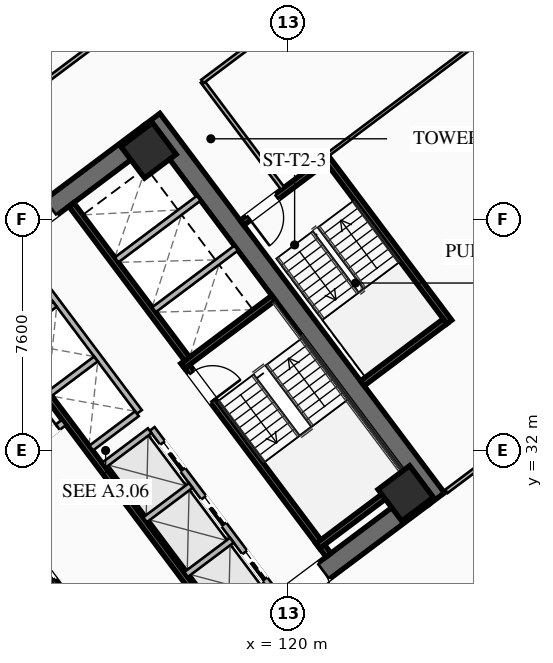
"""IFC4 building model, lengths in metres.
Left out: names, types, materials, properties, quantities, classifications, styles, units other than length and angle.
Written with IfcOpenShell. Run it as: python <this file> out.ifc"""

import sys

from ifc_helpers import new_model, si_unit, direction, frame, frame_2d, origin, origin_2d, place, context, subcontext, project, spatial, rectangle, hollow_rectangle, extrude, element, fill, save


model = new_model("IFC4")
c1 = context("Model", 3, precision=1e-05, world=origin(), true_north=direction((0.0, 1.0)))
c2 = subcontext(c1, "Body", "Model", "MODEL_VIEW")
j1 = project(units=[si_unit("LENGTHUNIT", "METRE"), si_unit("PLANEANGLEUNIT", "RADIAN")], contexts=[c1])
p1 = place(None, origin())
s1 = spatial("IfcSite", under=j1, at=p1, CompositionType="ELEMENT")
p2 = place(p1, origin())
s2 = spatial("IfcBuilding", under=s1, at=p2, CompositionType="ELEMENT")
p3 = place(p2, frame((0.0, 0.0, 102.7)))
s3 = spatial("IfcBuildingStorey", under=s2, at=p3, CompositionType="ELEMENT", Elevation=102.7)
for number, where, z_axis, x_axis in (
    (1, (112.476, 21.107, 0.0), (0.0, 0.0, 1.0), (-0.6, 0.8, 0.0)),
    (2, (115.524, 42.893, 0.0), (0.0, 0.0, 1.0), (0.6, -0.8, 0.0)),
):
    element("IfcWall", number, at=place(p3, frame(where, z_axis=z_axis, x_axis=x_axis)), inside=s3, PredefinedType="SHEAR", context=c2, shape_type="SweptSolid", body=[
        extrude(rectangle(XDim=15.6, YDim=0.65, at=frame_2d((7.8, 0.0))), origin(), (0.0, 0.0, 1.0), 3.55),
    ])
p4 = place(p3, frame((124.429, 30.478, 0.0), z_axis=(0.0, 0.0, 1.0), x_axis=(-0.799998028465, -0.600002628705, 0.0)))
e3 = element("IfcWall", 3, at=p4, inside=s3, PredefinedType="SHEAR", context=c2, shape_type="SweptSolid", body=[
    extrude(rectangle(XDim=14.86, YDim=0.65, at=frame_2d((7.43, 0.0))), origin(), (0.0, 0.0, 1.0), 3.55),
])
p5 = place(p4, frame((9.13, 0.0, 0.0)))
e4 = element("IfcOpeningElement", 4, at=p5, cuts=e3, PredefinedType="OPENING", context=c2, shape_type="SweptSolid", body=[
    extrude(rectangle(XDim=1.25, YDim=2.25, at=frame_2d((0.625, 1.125))), frame((0.0, 0.335, 0.0), z_axis=(0.0, -1.0, 0.0), x_axis=(1.0, 0.0, 0.0)), (0.0, 0.0, 1.0), 0.67),
])
p6 = place(p4, frame((4.08, 0.0, 0.0)))
e5 = element("IfcOpeningElement", 5, at=p6, cuts=e3, PredefinedType="OPENING", context=c2, shape_type="SweptSolid", body=[
    extrude(rectangle(XDim=1.25, YDim=2.25, at=frame_2d((0.625, 1.125))), frame((0.0, 0.335, 0.0), z_axis=(0.0, -1.0, 0.0), x_axis=(1.0, 0.0, 0.0)), (0.0, 0.0, 1.0), 0.67),
])
p7 = place(p3, frame((103.571, 33.522, 0.0), z_axis=(0.0, 0.0, 1.0), x_axis=(0.799998028465, 0.600002628705, 0.0)))
e6 = element("IfcWall", 6, at=p7, inside=s3, PredefinedType="SHEAR", context=c2, shape_type="SweptSolid", body=[
    extrude(rectangle(XDim=14.86, YDim=0.65, at=frame_2d((7.43, 0.0))), origin(), (0.0, 0.0, 1.0), 3.55),
])
p8 = place(p7, frame((4.48, 0.0, 0.0)))
e7 = element("IfcOpeningElement", 7, at=p8, cuts=e6, PredefinedType="OPENING", context=c2, shape_type="SweptSolid", body=[
    extrude(rectangle(XDim=1.25, YDim=2.25, at=frame_2d((0.625, 1.125))), frame((0.0, 0.335, 0.0), z_axis=(0.0, -1.0, 0.0), x_axis=(1.0, 0.0, 0.0)), (0.0, 0.0, 1.0), 0.67),
])
p9 = place(p7, frame((9.53, 0.0, 0.0)))
e8 = element("IfcOpeningElement", 8, at=p9, cuts=e6, PredefinedType="OPENING", context=c2, shape_type="SweptSolid", body=[
    extrude(rectangle(XDim=1.25, YDim=2.25, at=frame_2d((0.625, 1.125))), frame((0.0, 0.335, 0.0), z_axis=(0.0, -1.0, 0.0), x_axis=(1.0, 0.0, 0.0)), (0.0, 0.0, 1.0), 0.67),
])
for number, where, z_axis, x_axis in (
    (9, (123.87, 30.59, 0.0), (0.0, 0.0, 1.0), (0.8, 0.6, 0.0)),
    (10, (115.41, 41.87, 0.0), (0.0, 0.0, 1.0), (0.8, 0.6, 0.0)),
):
    element("IfcColumn", number, at=place(p3, frame(where, z_axis=z_axis, x_axis=x_axis)), inside=s3, PredefinedType="COLUMN", context=c2, shape_type="SweptSolid", body=[
        extrude(hollow_rectangle(XDim=1.3, YDim=1.3, WallThickness=0.05, at=origin_2d()), origin(), (0.0, 0.0, 1.0), 3.35),
    ])
p10 = place(p3, frame((116.56, 34.92, 0.0), z_axis=(0.0, 0.0, 1.0), x_axis=(0.600009827119, -0.799992629566, 0.0)))
e11 = element("IfcWall", 11, at=p10, inside=s3, PredefinedType="SHEAR", context=c2, shape_type="SweptSolid", body=[
    extrude(rectangle(XDim=7.95, YDim=0.2, at=frame_2d((3.975, 0.0))), origin(), (0.0, 0.0, 1.0), 3.35),
])
p11 = place(p10, frame((0.45, 0.0, 0.0)))
e12 = element("IfcOpeningElement", 12, at=p11, cuts=e11, PredefinedType="OPENING", context=c2, shape_type="SweptSolid", body=[
    extrude(rectangle(XDim=1.15, YDim=2.2, at=frame_2d((0.575, 1.1))), frame((0.0, 0.11, 0.0), z_axis=(0.0, -1.0, 0.0), x_axis=(1.0, 0.0, 0.0)), (0.0, 0.0, 1.0), 0.22),
])
for number, where, z_axis, x_axis in (
    (13, (116.54, 34.78, 0.0), (0.0, 0.0, 1.0), (0.8, 0.6, 0.0)),
    (14, (120.98, 28.86, 0.0), (0.0, 0.0, 1.0), (0.8, 0.6, 0.0)),
):
    element("IfcWall", number, at=place(p3, frame(where, z_axis=z_axis, x_axis=x_axis)), inside=s3, PredefinedType="SHEAR", context=c2, shape_type="SweptSolid", body=[
        extrude(rectangle(XDim=3.73, YDim=0.2, at=frame_2d((1.865, 0.0))), origin(), (0.0, 0.0, 1.0), 3.35),
    ])
p12 = place(p3, frame((117.938, 26.016, 0.0), z_axis=(0.0, 0.0, 1.0), x_axis=(-0.600005463273, 0.799995902516, 0.0)))
e15 = element("IfcWall", 15, at=p12, inside=s3, PredefinedType="SHEAR", context=c2, shape_type="SweptSolid", body=[
    extrude(rectangle(XDim=14.3, YDim=0.2, at=frame_2d((7.15, 0.0))), origin(), (0.0, 0.0, 1.0), 3.35),
])
p13 = place(p3, frame((110.104, 31.028, 0.0), z_axis=(0.0, 0.0, 1.0), x_axis=(0.800018601094, 0.59997519774, 0.0)))
e16 = element("IfcWall", 16, at=p13, inside=s3, PredefinedType="SOLIDWALL", context=c2, shape_type="SweptSolid", body=[
    extrude(rectangle(XDim=3.15, YDim=0.22, at=frame_2d((1.575, 0.0))), origin(), (0.0, 0.0, 1.0), 2.703),
])
p14 = place(p13, frame((0.25, 0.0, 0.0)))
e17 = element("IfcOpeningElement", 17, at=p14, cuts=e16, PredefinedType="OPENING", context=c2, shape_type="SweptSolid", body=[
    extrude(rectangle(XDim=0.95, YDim=2.05, at=frame_2d((0.475, 1.025))), frame((0.0, 0.12, 0.0), z_axis=(0.0, -1.0, 0.0), x_axis=(1.0, 0.0, 0.0)), (0.0, 0.0, 1.0), 0.24),
])
p15 = place(p13, frame((1.95, 0.0, 0.0)))
e18 = element("IfcOpeningElement", 18, at=p15, cuts=e16, PredefinedType="OPENING", context=c2, shape_type="SweptSolid", body=[
    extrude(rectangle(XDim=0.95, YDim=2.05, at=frame_2d((0.475, 1.025))), frame((0.0, 0.12, 0.0), z_axis=(0.0, -1.0, 0.0), x_axis=(1.0, 0.0, 0.0)), (0.0, 0.0, 1.0), 0.24),
])
p16 = place(p3, frame((115.13, 23.91, 0.0), z_axis=(0.0, 0.0, 1.0), x_axis=(-0.599975393228, 0.800018454488, 0.0)))
e19 = element("IfcWall", 19, at=p16, inside=s3, PredefinedType="SHEAR", context=c2, shape_type="SweptSolid", body=[
    extrude(rectangle(XDim=6.35, YDim=0.2, at=frame_2d((3.175, 0.0))), origin(), (0.0, 0.0, 1.0), 3.35),
])
p17 = place(p16, frame((4.775, 0.0, 0.0)))
e20 = element("IfcOpeningElement", 20, at=p17, cuts=e19, PredefinedType="OPENING", context=c2, shape_type="SweptSolid", body=[
    extrude(rectangle(XDim=1.3, YDim=2.25, at=frame_2d((0.65, 1.125))), frame((0.0, 0.11, 0.0), z_axis=(0.0, -1.0, 0.0), x_axis=(1.0, 0.0, 0.0)), (0.0, 0.0, 1.0), 0.22),
])
p18 = place(p16, frame((2.775, 0.0, 0.0)))
e21 = element("IfcOpeningElement", 21, at=p18, cuts=e19, PredefinedType="OPENING", context=c2, shape_type="SweptSolid", body=[
    extrude(rectangle(XDim=1.3, YDim=2.25, at=frame_2d((0.65, 1.125))), frame((0.0, 0.11, 0.0), z_axis=(0.0, -1.0, 0.0), x_axis=(1.0, 0.0, 0.0)), (0.0, 0.0, 1.0), 0.22),
])
p19 = place(p16, frame((0.575, 0.0, 0.0)))
e22 = element("IfcOpeningElement", 22, at=p19, cuts=e19, PredefinedType="OPENING", context=c2, shape_type="SweptSolid", body=[
    extrude(rectangle(XDim=1.3, YDim=2.25, at=frame_2d((0.65, 1.125))), frame((0.0, 0.11, 0.0), z_axis=(0.0, -1.0, 0.0), x_axis=(1.0, 0.0, 0.0)), (0.0, 0.0, 1.0), 0.22),
])
p20 = place(p3, frame((112.87, 40.09, 0.0), z_axis=(0.0, 0.0, 1.0), x_axis=(0.599975393228, -0.800018454488, 0.0)))
e23 = element("IfcWall", 23, at=p20, inside=s3, PredefinedType="SHEAR", context=c2, shape_type="SweptSolid", body=[
    extrude(rectangle(XDim=6.35, YDim=0.2, at=frame_2d((3.175, 0.0))), origin(), (0.0, 0.0, 1.0), 3.35),
])
for number, where, z_axis, x_axis in (
    (24, (115.59, 36.63, 0.0), (0.0, 0.0, 1.0), (0.8, 0.6, 0.0)),
    (25, (114.36, 38.27, 0.0), (0.0, 0.0, 1.0), (0.8, 0.6, 0.0)),
):
    element("IfcWall", number, at=place(p3, frame(where, z_axis=z_axis, x_axis=x_axis)), inside=s3, PredefinedType="SOLIDWALL", context=c2, shape_type="SweptSolid", body=[
        extrude(rectangle(XDim=3.38, YDim=0.2, at=frame_2d((1.69, 0.0))), origin(), (0.0, 0.0, 1.0), 3.35),
    ])
p21 = place(p3, frame((119.61, 27.27, 0.0), z_axis=(0.0, 0.0, 1.0), x_axis=(-0.600011488909, 0.79999138319, 0.0)))
e26 = element("IfcWall", 26, at=p21, inside=s3, PredefinedType="SOLIDWALL", context=c2, shape_type="SweptSolid", body=[
    extrude(rectangle(XDim=6.8, YDim=0.2, at=frame_2d((3.4, 0.0))), origin(), (0.0, 0.0, 1.0), 3.35),
])
p22 = place(p21, frame((0.625, 0.0, 0.0)))
e27 = element("IfcOpeningElement", 27, at=p22, cuts=e26, PredefinedType="OPENING", context=c2, shape_type="SweptSolid", body=[
    extrude(rectangle(XDim=1.1, YDim=2.2, at=frame_2d((0.55, 1.1))), frame((0.0, 0.11, 0.0), z_axis=(0.0, -1.0, 0.0), x_axis=(1.0, 0.0, 0.0)), (0.0, 0.0, 1.0), 0.22),
])
p23 = place(p21, frame((2.875, 0.0, 0.0)))
e28 = element("IfcOpeningElement", 28, at=p23, cuts=e26, PredefinedType="OPENING", context=c2, shape_type="SweptSolid", body=[
    extrude(rectangle(XDim=1.1, YDim=2.2, at=frame_2d((0.55, 1.1))), frame((0.0, 0.11, 0.0), z_axis=(0.0, -1.0, 0.0), x_axis=(1.0, 0.0, 0.0)), (0.0, 0.0, 1.0), 0.22),
])
p24 = place(p21, frame((5.125, 0.0, 0.0)))
e29 = element("IfcOpeningElement", 29, at=p24, cuts=e26, PredefinedType="OPENING", context=c2, shape_type="SweptSolid", body=[
    extrude(rectangle(XDim=1.1, YDim=2.2, at=frame_2d((0.55, 1.1))), frame((0.0, 0.11, 0.0), z_axis=(0.0, -1.0, 0.0), x_axis=(1.0, 0.0, 0.0)), (0.0, 0.0, 1.0), 0.22),
])
p25 = place(p3, frame((116.646, 27.922, 0.0), z_axis=(0.0, 0.0, 1.0), x_axis=(0.8, 0.6, 0.0)))
e30 = element("IfcWall", 30, at=p25, inside=s3, PredefinedType="SOLIDWALL", context=c2, shape_type="SweptSolid", body=[
    extrude(rectangle(XDim=1.88, YDim=0.2, at=frame_2d((0.94, 0.0))), origin(), (0.0, 0.0, 1.0), 3.35),
])
p26 = place(p3, frame((115.296, 29.722, 0.0), z_axis=(0.0, 0.0, 1.0), x_axis=(0.799984418148, 0.600020775241, 0.0)))
e31 = element("IfcWall", 31, at=p26, inside=s3, PredefinedType="SOLIDWALL", context=c2, shape_type="SweptSolid", body=[
    extrude(rectangle(XDim=1.88, YDim=0.2, at=frame_2d((0.94, 0.0))), origin(), (0.0, 0.0, 1.0), 3.35),
])
p27 = place(p3, frame((113.946, 31.522, 0.0), z_axis=(0.0, 0.0, 1.0), x_axis=(0.8, 0.6, 0.0)))
e32 = element("IfcWall", 32, at=p27, inside=s3, PredefinedType="SOLIDWALL", context=c2, shape_type="SweptSolid", body=[
    extrude(rectangle(XDim=1.88, YDim=0.2, at=frame_2d((0.94, 0.0))), origin(), (0.0, 0.0, 1.0), 3.35),
])
p28 = place(p3, frame((115.11, 33.27, 0.0), z_axis=(0.0, 0.0, 1.0), x_axis=(-0.600011488909, 0.79999138319, 0.0)))
e33 = element("IfcWall", 33, at=p28, inside=s3, PredefinedType="SOLIDWALL", context=c2, shape_type="SweptSolid", body=[
    extrude(rectangle(XDim=6.8, YDim=0.2, at=frame_2d((3.4, 0.0))), origin(), (0.0, 0.0, 1.0), 3.35),
])
p29 = place(p3, frame((113.526, 32.082, 0.0), z_axis=(0.0, 0.0, 1.0), x_axis=(0.800046745961, 0.599937666993, 0.0)))
e34 = element("IfcWall", 34, at=p29, inside=s3, PredefinedType="SOLIDWALL", context=c2, shape_type="SweptSolid", body=[
    extrude(rectangle(XDim=1.88, YDim=0.2, at=frame_2d((0.94, 0.0))), origin(), (0.0, 0.0, 1.0), 3.35),
])
p30 = place(p3, frame((112.176, 33.882, 0.0), z_axis=(0.0, 0.0, 1.0), x_axis=(0.8, 0.6, 0.0)))
e35 = element("IfcWall", 35, at=p30, inside=s3, PredefinedType="SOLIDWALL", context=c2, shape_type="SweptSolid", body=[
    extrude(rectangle(XDim=1.88, YDim=0.2, at=frame_2d((0.94, 0.0))), origin(), (0.0, 0.0, 1.0), 3.35),
])
p31 = place(p3, frame((110.826, 35.682, 0.0), z_axis=(0.0, 0.0, 1.0), x_axis=(0.799984418148, 0.600020775241, 0.0)))
e36 = element("IfcWall", 36, at=p31, inside=s3, PredefinedType="SOLIDWALL", context=c2, shape_type="SweptSolid", body=[
    extrude(rectangle(XDim=1.88, YDim=0.2, at=frame_2d((0.94, 0.0))), origin(), (0.0, 0.0, 1.0), 3.35),
])
p32 = place(p3, frame((125.304, 36.228, 0.0), z_axis=(0.0, 0.0, 1.0), x_axis=(-0.59998851072, 0.800008616831, 0.0)))
e37 = element("IfcWall", 37, at=p32, inside=s3, PredefinedType="SHEAR", context=c2, shape_type="SweptSolid", body=[
    extrude(rectangle(XDim=6.8, YDim=0.2, at=frame_2d((3.4, 0.0))), origin(), (0.0, 0.0, 1.0), 3.35),
])
p33 = place(p3, frame((121.204, 41.528, 0.0), z_axis=(0.0, 0.0, 1.0), x_axis=(-0.800017232136, -0.599977023131, 0.0)))
e38 = element("IfcWall", 38, at=p33, inside=s3, PredefinedType="SHEAR", context=c2, shape_type="SweptSolid", body=[
    extrude(rectangle(XDim=3.4, YDim=0.2, at=frame_2d((1.7, 0.0))), origin(), (0.0, 0.0, 1.0), 3.35),
])
p34 = place(p33, frame((1.975, 0.0, 0.0)))
e39 = element("IfcOpeningElement", 39, at=p34, cuts=e38, PredefinedType="OPENING", context=c2, shape_type="SweptSolid", body=[
    extrude(rectangle(XDim=1.15, YDim=2.2, at=frame_2d((0.575, 1.1))), frame((0.0, 0.11, 0.0), z_axis=(0.0, -1.0, 0.0), x_axis=(1.0, 0.0, 0.0)), (0.0, 0.0, 1.0), 0.22),
])
p35 = place(p3, frame((122.444, 34.208, 0.0), z_axis=(0.0, 0.0, 1.0), x_axis=(0.79999138319, 0.600011488909, 0.0)))
e40 = element("IfcWall", 40, at=p35, inside=s3, PredefinedType="SHEAR", context=c2, shape_type="SweptSolid", body=[
    extrude(rectangle(XDim=3.4, YDim=0.2, at=frame_2d((1.7, 0.0))), origin(), (0.0, 0.0, 1.0), 3.35),
])
p36 = place(p3, frame((119.824, 40.618, 0.0), z_axis=(0.0, 0.0, 1.0), x_axis=(-0.599982243973, 0.800013316712, 0.0)))
e41 = element("IfcWall", 41, at=p36, inside=s3, PredefinedType="PARTITIONING", context=c2, shape_type="SweptSolid", body=[
    extrude(rectangle(XDim=4.4, YDim=0.135, at=frame_2d((2.2, 0.0))), origin(), (0.0, 0.0, 1.0), 2.703),
])
p37 = place(p3, frame((98.316, 33.862, 0.0), z_axis=(0.0, 0.0, 1.0), x_axis=(0.8000041147, 0.599994513695, 0.0)))
e42 = element("IfcWall", 42, at=p37, inside=s3, PredefinedType="PARTITIONING", context=c2, shape_type="SweptSolid", body=[
    extrude(rectangle(XDim=28.48, YDim=0.135, at=frame_2d((14.24, 0.0))), origin(), (0.0, 0.0, 1.0), 2.703),
])
p38 = place(p37, frame((0.3, 0.0, 0.0)))
e43 = element("IfcOpeningElement", 43, at=p38, cuts=e42, PredefinedType="OPENING", context=c2, shape_type="SweptSolid", body=[
    extrude(rectangle(XDim=0.95, YDim=2.05, at=frame_2d((0.475, 1.025))), frame((0.0, 0.077, 0.0), z_axis=(0.0, -1.0, 0.0), x_axis=(1.0, 0.0, 0.0)), (0.0, 0.0, 1.0), 0.155),
])
p39 = place(p37, frame((10.9, 0.0, 0.0)))
e44 = element("IfcOpeningElement", 44, at=p39, cuts=e42, PredefinedType="OPENING", context=c2, shape_type="SweptSolid", body=[
    extrude(rectangle(XDim=0.95, YDim=2.05, at=frame_2d((0.475, 1.025))), frame((0.0, 0.077, 0.0), z_axis=(0.0, -1.0, 0.0), x_axis=(1.0, 0.0, 0.0)), (0.0, 0.0, 1.0), 0.155),
])
p40 = place(p37, frame((14.9, 0.0, 0.0)))
e45 = element("IfcOpeningElement", 45, at=p40, cuts=e42, PredefinedType="OPENING", context=c2, shape_type="SweptSolid", body=[
    extrude(rectangle(XDim=0.95, YDim=2.05, at=frame_2d((0.475, 1.025))), frame((0.0, 0.077, 0.0), z_axis=(0.0, -1.0, 0.0), x_axis=(1.0, 0.0, 0.0)), (0.0, 0.0, 1.0), 0.155),
])
p41 = place(p37, frame((27.23, 0.0, 0.0)))
e46 = element("IfcOpeningElement", 46, at=p41, cuts=e42, PredefinedType="OPENING", context=c2, shape_type="SweptSolid", body=[
    extrude(rectangle(XDim=0.95, YDim=2.05, at=frame_2d((0.475, 1.025))), frame((0.0, 0.077, 0.0), z_axis=(0.0, -1.0, 0.0), x_axis=(1.0, 0.0, 0.0)), (0.0, 0.0, 1.0), 0.155),
])
p42 = place(p3, frame((134.462, 33.134, 0.0), z_axis=(0.0, 0.0, 1.0), x_axis=(-0.799996913945, -0.600004114717, 0.0)))
e47 = element("IfcWall", 47, at=p42, inside=s3, PredefinedType="PARTITIONING", context=c2, shape_type="SweptSolid", body=[
    extrude(rectangle(XDim=28.48, YDim=0.135, at=frame_2d((14.24, 0.0))), origin(), (0.0, 0.0, 1.0), 2.703),
])
p43 = place(p42, frame((27.15, 0.0, 0.0)))
e48 = element("IfcOpeningElement", 48, at=p43, cuts=e47, PredefinedType="OPENING", context=c2, shape_type="SweptSolid", body=[
    extrude(rectangle(XDim=0.95, YDim=2.05, at=frame_2d((0.475, 1.025))), frame((0.0, 0.077, 0.0), z_axis=(0.0, -1.0, 0.0), x_axis=(1.0, 0.0, 0.0)), (0.0, 0.0, 1.0), 0.155),
])
p44 = place(p42, frame((16.321, 0.0, 0.0)))
e49 = element("IfcOpeningElement", 49, at=p44, cuts=e47, PredefinedType="OPENING", context=c2, shape_type="SweptSolid", body=[
    extrude(rectangle(XDim=0.95, YDim=2.05, at=frame_2d((0.475, 1.025))), frame((0.0, 0.077, 0.0), z_axis=(0.0, -1.0, 0.0), x_axis=(1.0, 0.0, 0.0)), (0.0, 0.0, 1.0), 0.155),
])
p45 = place(p42, frame((12.529, 0.0, 0.0)))
e50 = element("IfcOpeningElement", 50, at=p45, cuts=e47, PredefinedType="OPENING", context=c2, shape_type="SweptSolid", body=[
    extrude(rectangle(XDim=0.95, YDim=2.05, at=frame_2d((0.475, 1.025))), frame((0.0, 0.077, 0.0), z_axis=(0.0, -1.0, 0.0), x_axis=(1.0, 0.0, 0.0)), (0.0, 0.0, 1.0), 0.155),
])
p46 = place(p42, frame((0.38, 0.0, 0.0)))
e51 = element("IfcOpeningElement", 51, at=p46, cuts=e47, PredefinedType="OPENING", context=c2, shape_type="SweptSolid", body=[
    extrude(rectangle(XDim=0.95, YDim=2.05, at=frame_2d((0.475, 1.025))), frame((0.0, 0.077, 0.0), z_axis=(0.0, -1.0, 0.0), x_axis=(1.0, 0.0, 0.0)), (0.0, 0.0, 1.0), 0.155),
])
p47 = place(p3, frame((125.224, 50.168, 0.0), z_axis=(0.0, 0.0, 1.0), x_axis=(-0.8, -0.6, 0.0)))
e52 = element("IfcWall", 52, at=p47, inside=s3, PredefinedType="PARTITIONING", context=c2, shape_type="SweptSolid", body=[
    extrude(rectangle(XDim=10.05, YDim=0.135, at=frame_2d((5.025, 0.0))), origin(), (0.0, 0.0, 1.0), 2.703),
])
p48 = place(p47, frame((4.9, 0.0, 0.0)))
e53 = element("IfcOpeningElement", 53, at=p48, cuts=e52, PredefinedType="OPENING", context=c2, shape_type="SweptSolid", body=[
    extrude(rectangle(XDim=0.95, YDim=2.05, at=frame_2d((0.475, 1.025))), frame((0.0, 0.077, 0.0), z_axis=(0.0, -1.0, 0.0), x_axis=(1.0, 0.0, 0.0)), (0.0, 0.0, 1.0), 0.155),
])
p49 = place(p3, frame((125.208, 30.656, 0.0), z_axis=(0.0, 0.0, 1.0), x_axis=(0.8, 0.6, 0.0)))
e54 = element("IfcWall", 54, at=p49, inside=s3, PredefinedType="PARTITIONING", context=c2, shape_type="SweptSolid", body=[
    extrude(rectangle(XDim=11.72, YDim=0.135, at=frame_2d((5.86, 0.0))), origin(), (0.0, 0.0, 1.0), 2.703),
])
p50 = place(p49, frame((2.045, 0.0, 0.0)))
e55 = element("IfcOpeningElement", 55, at=p50, cuts=e54, PredefinedType="OPENING", context=c2, shape_type="SweptSolid", body=[
    extrude(rectangle(XDim=0.95, YDim=2.05, at=frame_2d((0.475, 1.025))), frame((0.0, 0.077, 0.0), z_axis=(0.0, -1.0, 0.0), x_axis=(1.0, 0.0, 0.0)), (0.0, 0.0, 1.0), 0.155),
])
p51 = place(p3, frame((127.864, 46.648, 0.0), z_axis=(0.0, 0.0, 1.0), x_axis=(-0.800007145523, -0.599990472518, 0.0)))
e56 = element("IfcWall", 56, at=p51, inside=s3, PredefinedType="PARTITIONING", context=c2, shape_type="SweptSolid", body=[
    extrude(rectangle(XDim=8.2, YDim=0.11, at=frame_2d((4.1, 0.0))), origin(), (0.0, 0.0, 1.0), 2.703),
])
p52 = place(p6, origin())
e57 = element("IfcDoor", 57, at=p52, inside=s3, OperationType="SINGLE_SWING_RIGHT", PredefinedType="DOOR", context=c2, shape_type="SweptSolid", body=[
    extrude(rectangle(XDim=1.25, YDim=2.25, at=frame_2d((0.625, 1.125))), frame((0.0, 0.025, 0.0), z_axis=(0.0, -1.0, 0.0), x_axis=(1.0, 0.0, 0.0)), (0.0, 0.0, 1.0), 0.05),
])
fill(e5, e57)
p53 = place(p11, origin())
e58 = element("IfcDoor", 58, at=p53, inside=s3, OperationType="SINGLE_SWING_RIGHT", PredefinedType="DOOR", context=c2, shape_type="SweptSolid", body=[
    extrude(rectangle(XDim=1.15, YDim=2.2, at=frame_2d((0.575, 1.1))), frame((0.0, 0.025, 0.0), z_axis=(0.0, -1.0, 0.0), x_axis=(1.0, 0.0, 0.0)), (0.0, 0.0, 1.0), 0.05),
])
fill(e12, e58)
p54 = place(p15, origin())
e59 = element("IfcDoor", 59, at=p54, inside=s3, OperationType="SINGLE_SWING_RIGHT", PredefinedType="DOOR", context=c2, shape_type="SweptSolid", body=[
    extrude(rectangle(XDim=0.95, YDim=2.05, at=frame_2d((0.475, 1.025))), frame((0.0, 0.025, 0.0), z_axis=(0.0, -1.0, 0.0), x_axis=(1.0, 0.0, 0.0)), (0.0, 0.0, 1.0), 0.05),
])
fill(e18, e59)
p55 = place(p34, origin())
e60 = element("IfcDoor", 60, at=p55, inside=s3, OperationType="SINGLE_SWING_RIGHT", PredefinedType="DOOR", context=c2, shape_type="SweptSolid", body=[
    extrude(rectangle(XDim=1.15, YDim=2.2, at=frame_2d((0.575, 1.1))), frame((0.0, 0.025, 0.0), z_axis=(0.0, -1.0, 0.0), x_axis=(1.0, 0.0, 0.0)), (0.0, 0.0, 1.0), 0.05),
])
fill(e39, e60)
p56 = place(p17, origin())
e61 = element("IfcDoor", 61, at=p56, inside=s3, OperationType="SLIDING_TO_LEFT", PredefinedType="DOOR", context=c2, shape_type="SweptSolid", body=[
    extrude(rectangle(XDim=1.3, YDim=2.25, at=frame_2d((0.65, 1.125))), frame((0.0, 0.025, 0.0), z_axis=(0.0, -1.0, 0.0), x_axis=(1.0, 0.0, 0.0)), (0.0, 0.0, 1.0), 0.05),
])
fill(e20, e61)
p57 = place(p22, origin())
e62 = element("IfcDoor", 62, at=p57, inside=s3, OperationType="SLIDING_TO_LEFT", PredefinedType="DOOR", context=c2, shape_type="SweptSolid", body=[
    extrude(rectangle(XDim=1.1, YDim=2.2, at=frame_2d((0.55, 1.1))), frame((0.0, 0.025, 0.0), z_axis=(0.0, -1.0, 0.0), x_axis=(1.0, 0.0, 0.0)), (0.0, 0.0, 1.0), 0.05),
])
fill(e27, e62)
p58 = place(p23, origin())
e63 = element("IfcDoor", 63, at=p58, inside=s3, OperationType="SLIDING_TO_LEFT", PredefinedType="DOOR", context=c2, shape_type="SweptSolid", body=[
    extrude(rectangle(XDim=1.1, YDim=2.2, at=frame_2d((0.55, 1.1))), frame((0.0, 0.025, 0.0), z_axis=(0.0, -1.0, 0.0), x_axis=(1.0, 0.0, 0.0)), (0.0, 0.0, 1.0), 0.05),
])
fill(e28, e63)
p59 = place(p24, origin())
e64 = element("IfcDoor", 64, at=p59, inside=s3, OperationType="SLIDING_TO_LEFT", PredefinedType="DOOR", context=c2, shape_type="SweptSolid", body=[
    extrude(rectangle(XDim=1.1, YDim=2.2, at=frame_2d((0.55, 1.1))), frame((0.0, 0.025, 0.0), z_axis=(0.0, -1.0, 0.0), x_axis=(1.0, 0.0, 0.0)), (0.0, 0.0, 1.0), 0.05),
])
fill(e29, e64)
save(model, sys.argv[1])
